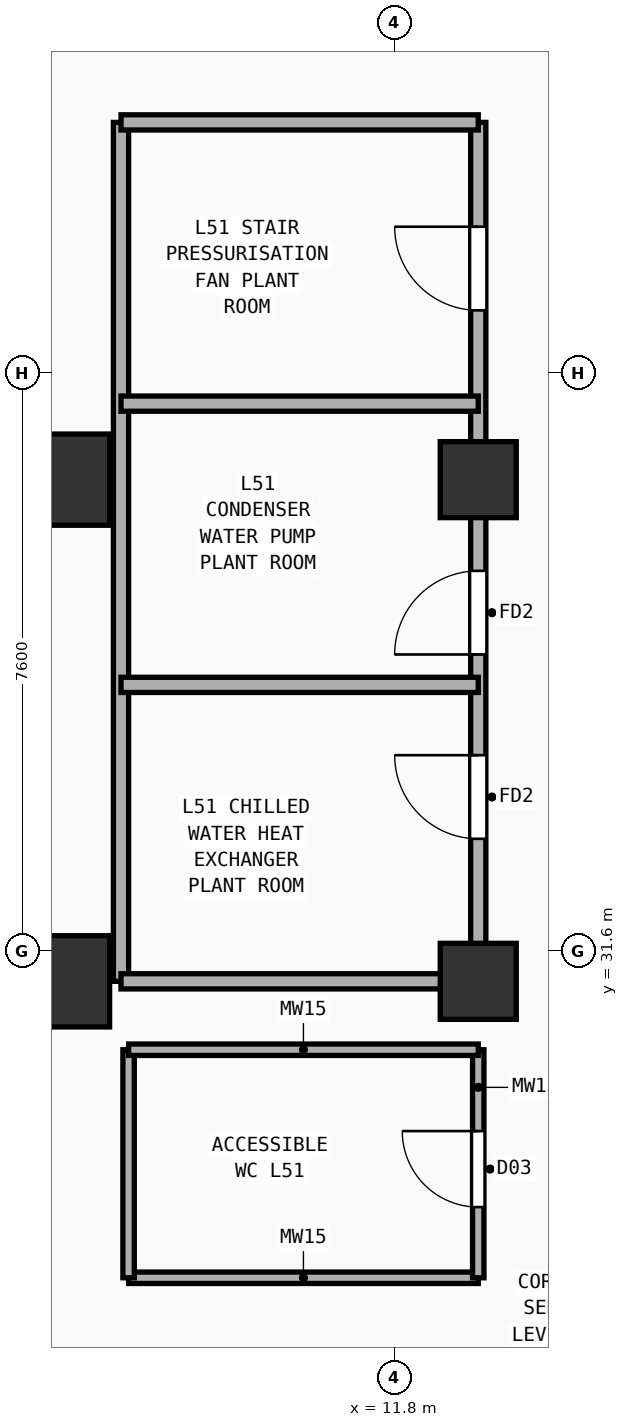
"""IFC4 building model, lengths in metres.
Left out: names, types, materials, properties, quantities, classifications, styles, units other than length and angle.
Written with IfcOpenShell. Run it as: python <this file> out.ifc"""

import sys

from ifc_helpers import new_model, si_unit, direction, frame, frame_2d, origin, origin_2d, place, context, subcontext, project, spatial, rectangle, extrude, element, fill, save


model = new_model("IFC4")
c1 = context("Model", 3, precision=1e-05, world=origin(), true_north=direction((0.0, 1.0)))
c2 = subcontext(c1, "Body", "Model", "MODEL_VIEW")
j1 = project(units=[si_unit("LENGTHUNIT", "METRE"), si_unit("PLANEANGLEUNIT", "RADIAN")], contexts=[c1])
p1 = place(None, origin())
s1 = spatial("IfcSite", under=j1, at=p1, CompositionType="ELEMENT")
p2 = place(p1, origin())
s2 = spatial("IfcBuilding", under=s1, at=p2, CompositionType="ELEMENT")
p3 = place(p2, frame((0.0, 0.0, 199.4)))
s3 = spatial("IfcBuildingStorey", under=s2, at=p3, CompositionType="ELEMENT", Elevation=199.4)
for number, where, z_axis, x_axis in (
    (1, (7.45, 31.2, 0.0), (0.0, 0.0, 1.0), (1.0, 0.0, 0.0)),
    (2, (7.45, 37.8, 0.0), (0.0, 0.0, 1.0), (1.0, 0.0, 0.0)),
):
    element("IfcColumn", number, at=place(p3, frame(where, z_axis=z_axis, x_axis=x_axis)), inside=s3, PredefinedType="COLUMN", context=c2, shape_type="SweptSolid", body=[
        extrude(rectangle(XDim=1.2, YDim=1.2, at=origin_2d()), origin(), (0.0, 0.0, 1.0), 4.86),
    ])
for number, where, z_axis, x_axis in (
    (3, (12.9, 31.2, 0.0), (0.0, 0.0, 1.0), (1.0, 0.0, 0.0)),
    (4, (12.9, 37.8, 0.0), (0.0, 0.0, 1.0), (1.0, 0.0, 0.0)),
):
    element("IfcColumn", number, at=place(p3, frame(where, z_axis=z_axis, x_axis=x_axis)), inside=s3, PredefinedType="COLUMN", context=c2, shape_type="SweptSolid", body=[
        extrude(rectangle(XDim=1.0, YDim=1.0, at=origin_2d()), origin(), (0.0, 0.0, 1.0), 4.86),
    ])
p4 = place(p3, frame((8.3, 27.3, 0.0), z_axis=(0.0, 0.0, 1.0), x_axis=(1.0, 0.0, 0.0)))
e5 = element("IfcWall", 5, at=p4, inside=s3, PredefinedType="PLUMBINGWALL", context=c2, shape_type="SweptSolid", body=[
    extrude(rectangle(XDim=4.6, YDim=0.15, at=frame_2d((2.3, 0.0))), origin(), (0.0, 0.0, 1.0), 4.86),
])
p5 = place(p3, frame((8.3, 27.3, 0.0), z_axis=(0.0, 0.0, 1.0), x_axis=(0.0, 1.0, 0.0)))
e6 = element("IfcWall", 6, at=p5, inside=s3, PredefinedType="PLUMBINGWALL", context=c2, shape_type="SweptSolid", body=[
    extrude(rectangle(XDim=3.0, YDim=0.15, at=frame_2d((1.5, 0.0))), origin(), (0.0, 0.0, 1.0), 4.86),
])
p6 = place(p3, frame((12.9, 27.3, 0.0), z_axis=(0.0, 0.0, 1.0), x_axis=(0.0, 1.0, 0.0)))
e7 = element("IfcWall", 7, at=p6, inside=s3, PredefinedType="PLUMBINGWALL", context=c2, shape_type="SweptSolid", body=[
    extrude(rectangle(XDim=3.0, YDim=0.15, at=frame_2d((1.5, 0.0))), origin(), (0.0, 0.0, 1.0), 4.06),
])
p7 = place(p6, frame((0.93, 0.0, 0.0)))
e8 = element("IfcOpeningElement", 8, at=p7, cuts=e7, PredefinedType="OPENING", context=c2, shape_type="SweptSolid", body=[
    extrude(rectangle(XDim=1.0, YDim=2.2, at=frame_2d((0.5, 1.1))), frame((0.0, 0.085, 0.0), z_axis=(0.0, -1.0, 0.0), x_axis=(1.0, 0.0, 0.0)), (0.0, 0.0, 1.0), 0.17),
])
p8 = place(p3, frame((8.3, 30.3, 0.0), z_axis=(0.0, 0.0, 1.0), x_axis=(1.0, 0.0, 0.0)))
e9 = element("IfcWall", 9, at=p8, inside=s3, PredefinedType="PLUMBINGWALL", context=c2, shape_type="SweptSolid", body=[
    extrude(rectangle(XDim=4.6, YDim=0.15, at=frame_2d((2.3, 0.0))), origin(), (0.0, 0.0, 1.0), 4.86),
])
p9 = place(p3, frame((12.9, 31.2, 0.0), z_axis=(0.0, 0.0, 1.0), x_axis=(0.0, 1.0, 0.0)))
e10 = element("IfcWall", 10, at=p9, inside=s3, PredefinedType="PARTITIONING", context=c2, shape_type="SweptSolid", body=[
    extrude(rectangle(XDim=11.3, YDim=0.2, at=frame_2d((5.65, 0.0))), origin(), (0.0, 0.0, 1.0), 4.06),
])
p10 = place(p9, frame((1.875, 0.0, 0.0)))
e11 = element("IfcOpeningElement", 11, at=p10, cuts=e10, PredefinedType="OPENING", context=c2, shape_type="SweptSolid", body=[
    extrude(rectangle(XDim=1.1, YDim=2.2, at=frame_2d((0.55, 1.1))), frame((0.0, 0.11, 0.0), z_axis=(0.0, -1.0, 0.0), x_axis=(1.0, 0.0, 0.0)), (0.0, 0.0, 1.0), 0.22),
])
p11 = place(p9, frame((4.3, 0.0, 0.0)))
e12 = element("IfcOpeningElement", 12, at=p11, cuts=e10, PredefinedType="OPENING", context=c2, shape_type="SweptSolid", body=[
    extrude(rectangle(XDim=1.1, YDim=2.2, at=frame_2d((0.55, 1.1))), frame((0.0, 0.11, 0.0), z_axis=(0.0, -1.0, 0.0), x_axis=(1.0, 0.0, 0.0)), (0.0, 0.0, 1.0), 0.22),
])
p12 = place(p9, frame((8.827, 0.0, 0.0)))
e13 = element("IfcOpeningElement", 13, at=p12, cuts=e10, PredefinedType="OPENING", context=c2, shape_type="SweptSolid", body=[
    extrude(rectangle(XDim=1.1, YDim=2.2, at=frame_2d((0.55, 1.1))), frame((0.0, 0.11, 0.0), z_axis=(0.0, -1.0, 0.0), x_axis=(1.0, 0.0, 0.0)), (0.0, 0.0, 1.0), 0.22),
])
p13 = place(p3, frame((8.2, 31.2, 0.0), z_axis=(0.0, 0.0, 1.0), x_axis=(0.0, 1.0, 0.0)))
e14 = element("IfcWall", 14, at=p13, inside=s3, PredefinedType="PARTITIONING", context=c2, shape_type="SweptSolid", body=[
    extrude(rectangle(XDim=11.3, YDim=0.2, at=frame_2d((5.65, 0.0))), origin(), (0.0, 0.0, 1.0), 4.86),
])
p14 = place(p3, frame((8.2, 31.2, 0.0), z_axis=(0.0, 0.0, 1.0), x_axis=(1.0, 0.0, 0.0)))
e15 = element("IfcWall", 15, at=p14, inside=s3, PredefinedType="PARTITIONING", context=c2, shape_type="SweptSolid", body=[
    extrude(rectangle(XDim=4.7, YDim=0.2, at=frame_2d((2.35, 0.0))), origin(), (0.0, 0.0, 1.0), 4.06),
])
p15 = place(p3, frame((8.2, 42.5, 0.0), z_axis=(0.0, 0.0, 1.0), x_axis=(1.0, 0.0, 0.0)))
e16 = element("IfcWall", 16, at=p15, inside=s3, PredefinedType="PARTITIONING", context=c2, shape_type="SweptSolid", body=[
    extrude(rectangle(XDim=4.7, YDim=0.2, at=frame_2d((2.35, 0.0))), origin(), (0.0, 0.0, 1.0), 4.5),
])
for number, where, z_axis, x_axis in (
    (17, (8.2, 35.1, 0.0), (0.0, 0.0, 1.0), (1.0, 0.0, 0.0)),
    (18, (8.2, 38.8, 0.0), (0.0, 0.0, 1.0), (1.0, 0.0, 0.0)),
):
    element("IfcWall", number, at=place(p3, frame(where, z_axis=z_axis, x_axis=x_axis)), inside=s3, PredefinedType="PARTITIONING", context=c2, shape_type="SweptSolid", body=[
        extrude(rectangle(XDim=4.7, YDim=0.2, at=frame_2d((2.35, 0.0))), origin(), (0.0, 0.0, 1.0), 4.86),
    ])
p16 = place(p7, origin())
e19 = element("IfcDoor", 19, at=p16, inside=s3, OperationType="SINGLE_SWING_RIGHT", PredefinedType="DOOR", context=c2, shape_type="SweptSolid", body=[
    extrude(rectangle(XDim=1.0, YDim=2.2, at=frame_2d((0.5, 1.1))), frame((0.0, 0.025, 0.0), z_axis=(0.0, -1.0, 0.0), x_axis=(1.0, 0.0, 0.0)), (0.0, 0.0, 1.0), 0.05),
])
fill(e8, e19)
p17 = place(p10, origin())
e20 = element("IfcDoor", 20, at=p17, inside=s3, OperationType="SINGLE_SWING_RIGHT", PredefinedType="DOOR", context=c2, shape_type="SweptSolid", body=[
    extrude(rectangle(XDim=1.1, YDim=2.2, at=frame_2d((0.55, 1.1))), frame((0.0, 0.025, 0.0), z_axis=(0.0, -1.0, 0.0), x_axis=(1.0, 0.0, 0.0)), (0.0, 0.0, 1.0), 0.05),
])
fill(e11, e20)
p18 = place(p11, origin())
e21 = element("IfcDoor", 21, at=p18, inside=s3, OperationType="SINGLE_SWING_LEFT", PredefinedType="DOOR", context=c2, shape_type="SweptSolid", body=[
    extrude(rectangle(XDim=1.1, YDim=2.2, at=frame_2d((0.55, 1.1))), frame((0.0, 0.025, 0.0), z_axis=(0.0, -1.0, 0.0), x_axis=(1.0, 0.0, 0.0)), (0.0, 0.0, 1.0), 0.05),
])
fill(e12, e21)
p19 = place(p12, origin())
e22 = element("IfcDoor", 22, at=p19, inside=s3, OperationType="SINGLE_SWING_RIGHT", PredefinedType="DOOR", context=c2, shape_type="SweptSolid", body=[
    extrude(rectangle(XDim=1.1, YDim=2.2, at=frame_2d((0.55, 1.1))), frame((0.0, 0.025, 0.0), z_axis=(0.0, -1.0, 0.0), x_axis=(1.0, 0.0, 0.0)), (0.0, 0.0, 1.0), 0.05),
])
fill(e13, e22)
save(model, sys.argv[1])
